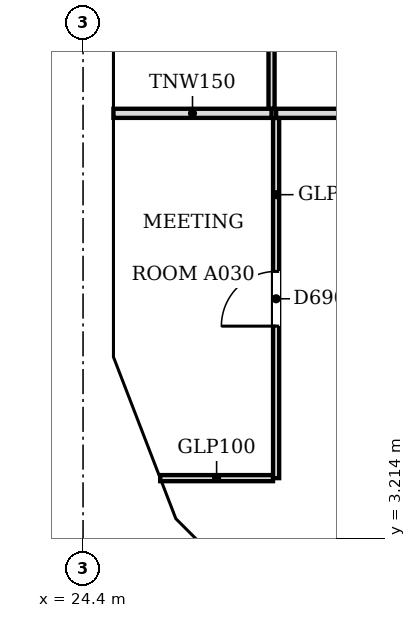
"""IFC4 building model, lengths in metres.
Left out: names, types, materials, properties, quantities, classifications, styles, units other than length and angle.
Written with IfcOpenShell. Run it as: python <this file> out.ifc"""

import sys

from ifc_helpers import new_model, si_unit, direction, frame, frame_2d, origin, place, context, subcontext, project, spatial, polyline, rectangle, outline, extrude, faceted_brep, source, transform, mapped, element, fill, save


model = new_model("IFC4")
c1 = context("Model", 3, precision=1e-05, world=origin(), true_north=direction((0.0, 1.0)))
c2 = subcontext(c1, "Body", "Model", "MODEL_VIEW")
j1 = project(units=[si_unit("LENGTHUNIT", "METRE"), si_unit("PLANEANGLEUNIT", "RADIAN")], contexts=[c1])
p1 = place(None, origin())
s1 = spatial("IfcSite", under=j1, at=p1, CompositionType="ELEMENT")
p2 = place(p1, origin())
s2 = spatial("IfcBuilding", under=s1, at=p2, CompositionType="ELEMENT")
p3 = place(p2, frame((0.0, 0.0, 99.0)))
s3 = spatial("IfcBuildingStorey", under=s2, at=p3, CompositionType="ELEMENT", Elevation=99.0)
m1 = source(origin(), c2, "Body", "Brep", [
    faceted_brep([(3.096, -0.25, 0.0), (6.1, -0.25, 3.8), (3.096, -0.25, 7.6), (0.047, -0.25, 3.857), (0.047, -0.25, 3.743), (0.0, 0.25, 3.8), (3.096, 0.25, 7.6), (6.053, 0.25, 3.859), (6.053, 0.25, 3.741), (3.096, 0.25, 0.0), (6.1, -0.0, 3.8), (0.0, 0.0, 3.8)], [[[0, 1, 2, 3, 4]], [[5, 6, 7, 8, 9]], [[9, 8, 10, 1, 0]], [[7, 6, 2, 1, 10]], [[6, 5, 11, 3, 2]], [[5, 9, 0, 4, 11]], [[11, 4, 3]], [[10, 8, 7]]]),
])
p4 = place(p3, frame((24.65, 12.247, -3.8), z_axis=(0.0, 0.0, 1.0), x_axis=(0.0, -1.0, 0.0)))
e1 = element("IfcWall", 1, at=p4, inside=s3, PredefinedType="SOLIDWALL", context=c2, shape_type="MappedRepresentation", body=[
    mapped(m1, transform((0.0, 0.0, 0.0), scale=1.0)),
])
m2 = source(origin(), c2, "Body", "SweptSolid", [
    extrude(outline(polyline([(3.094, 0.399), (5.781, 3.8), (3.094, 7.201), (0.323, 3.8), (3.094, 0.399)])), frame((0.0, 0.26, 0.0), z_axis=(0.0, -1.0, 0.0), x_axis=(1.0, 0.0, 0.0)), (0.0, 0.0, 1.0), 0.52),
])
p5 = place(p4, origin())
e2 = element("IfcOpeningElement", 2, at=p5, cuts=e1, PredefinedType="OPENING", context=c2, shape_type="MappedRepresentation", body=[
    mapped(m2, transform((0.0, 0.0, 0.0), scale=1.0)),
])
m3 = source(origin(), c2, "Body", "Brep", [
    faceted_brep([(2.95, -0.25, 0.0), (3.003, -0.25, 0.068), (3.003, -0.25, 7.532), (2.95, -0.25, 7.6), (0.0, -0.25, 3.8), (0.047, 0.25, 3.86), (2.898, 0.25, 7.532), (2.898, 0.25, 0.068), (0.047, 0.25, 3.74), (2.95, 0.0, 0.0), (2.95, 0.0, 7.6), (0.0, 0.0, 3.8)], [[[0, 1, 2, 3, 4]], [[5, 6, 7, 8]], [[1, 0, 9]], [[10, 3, 2]], [[6, 5, 11, 4, 3, 10]], [[8, 7, 9, 0, 4, 11]], [[8, 11, 5]], [[1, 9, 7, 6, 10, 2]]]),
])
p6 = place(p3, frame((24.65, 6.146, -3.8), z_axis=(0.0, 0.0, 1.0), x_axis=(0.359953949349, -0.932970071518, 0.0)))
e3 = element("IfcWall", 3, at=p6, inside=s3, PredefinedType="SOLIDWALL", context=c2, shape_type="MappedRepresentation", body=[
    mapped(m3, transform((0.0, 0.0, 0.0), scale=1.0)),
])
m4 = source(origin(), c2, "Body", "SweptSolid", [
    extrude(outline(polyline([(2.75, 6.935), (0.316, 3.8), (2.75, 0.665), (2.75, 6.935)])), frame((0.0, 0.26, 0.0), z_axis=(0.0, -1.0, 0.0), x_axis=(1.0, 0.0, 0.0)), (0.0, 0.0, 1.0), 0.52),
])
p7 = place(p6, origin())
e4 = element("IfcOpeningElement", 4, at=p7, cuts=e3, PredefinedType="OPENING", context=c2, shape_type="MappedRepresentation", body=[
    mapped(m4, transform((0.0, 0.0, 0.0), scale=1.0)),
])
m5 = source(origin(), c2, "Body", "Brep", [
    faceted_brep([(0.053, -0.25, 0.0), (2.997, -0.25, 3.8), (0.053, -0.25, 7.6), (0.0, -0.25, 7.532), (0.0, -0.25, 0.068), (0.106, 0.25, 7.532), (2.944, 0.25, 3.868), (2.944, 0.25, 3.732), (0.106, 0.25, 0.068), (2.997, 0.0, 3.8), (0.053, 0.0, 0.0), (0.053, 0.0, 7.6)], [[[0, 1, 2, 3, 4]], [[5, 6, 7, 8]], [[8, 7, 9, 1, 0, 10]], [[6, 5, 11, 2, 1, 9]], [[3, 2, 11]], [[10, 0, 4]], [[8, 10, 4, 3, 11, 5]], [[9, 7, 6]]]),
])
p8 = place(p3, frame((25.675, 3.431, -3.8), z_axis=(0.0, 0.0, 1.0), x_axis=(0.707106781187, -0.707106781187, 0.0)))
e5 = element("IfcWall", 5, at=p8, inside=s3, PredefinedType="SOLIDWALL", context=c2, shape_type="MappedRepresentation", body=[
    mapped(m5, transform((0.0, 0.0, 0.0), scale=1.0)),
])
m6 = source(origin(), c2, "Body", "SweptSolid", [
    extrude(outline(polyline([(0.253, 0.666), (2.681, 3.8), (0.253, 6.934), (0.253, 0.666)])), frame((0.0, 0.26, 0.0), z_axis=(0.0, -1.0, 0.0), x_axis=(1.0, 0.0, 0.0)), (0.0, 0.0, 1.0), 0.52),
])
p9 = place(p8, origin())
e6 = element("IfcOpeningElement", 6, at=p9, cuts=e5, PredefinedType="OPENING", context=c2, shape_type="MappedRepresentation", body=[
    mapped(m6, transform((0.0, 0.0, 0.0), scale=1.0)),
])
p10 = place(p2, frame((0.0, 0.0, 102.8)))
s4 = spatial("IfcBuildingStorey", under=s2, at=p10, CompositionType="ELEMENT", Elevation=102.8)
m7 = source(origin(), c2, "Body", "Brep", [
    faceted_brep([(0.093, -0.25, 0.057), (3.143, -0.25, 3.8), (0.093, -0.25, 7.543), (0.0, 0.25, 7.544), (0.047, 0.25, 7.6), (3.143, 0.25, 3.8), (0.047, 0.25, 0.0), (0.0, 0.25, 0.056), (0.047, 0.0, 0.0), (0.047, 0.0, 7.6)], [[[0, 1, 2]], [[3, 4, 5, 6, 7]], [[6, 5, 1, 0, 8]], [[5, 4, 9, 2, 1]], [[4, 3, 9]], [[7, 6, 8]], [[7, 8, 0, 2, 9, 3]]]),
])
p11 = place(p10, frame((24.65, 12.293, -3.8), z_axis=(0.0, 0.0, 1.0), x_axis=(0.0, -1.0, 0.0)))
e7 = element("IfcWall", 7, at=p11, inside=s4, PredefinedType="SOLIDWALL", context=c2, shape_type="MappedRepresentation", body=[
    mapped(m7, transform((0.0, 0.0, 0.0), scale=1.0)),
])
m8 = source(origin(), c2, "Body", "SweptSolid", [
    extrude(outline(polyline([(0.247, 0.641), (2.821, 3.8), (0.247, 6.959), (0.247, 0.641)])), frame((0.0, 0.26, 0.0), z_axis=(0.0, -1.0, 0.0), x_axis=(1.0, 0.0, 0.0)), (0.0, 0.0, 1.0), 0.52),
])
p12 = place(p11, origin())
e8 = element("IfcOpeningElement", 8, at=p12, cuts=e7, PredefinedType="OPENING", context=c2, shape_type="MappedRepresentation", body=[
    mapped(m8, transform((0.0, 0.0, 0.0), scale=1.0)),
])
m9 = source(origin(), c2, "Body", "Brep", [
    faceted_brep([(3.003, -0.25, 0.0), (3.05, -0.25, 0.06), (3.05, -0.25, 7.54), (3.003, -0.25, 7.6), (0.0, -0.25, 3.8), (0.0, 0.25, 3.8), (2.957, 0.25, 7.541), (2.957, 0.25, 0.059), (3.003, 0.0, 0.0), (3.003, 0.0, 7.6)], [[[0, 1, 2, 3, 4]], [[5, 6, 7]], [[1, 0, 8]], [[9, 3, 2]], [[6, 5, 4, 3, 9]], [[5, 7, 8, 0, 4]], [[1, 8, 7, 6, 9, 2]]]),
])
p13 = place(p10, frame((24.65, 9.15, -3.8), z_axis=(0.0, 0.0, 1.0), x_axis=(0.0, -1.0, 0.0)))
e9 = element("IfcWall", 9, at=p13, inside=s4, PredefinedType="SOLIDWALL", context=c2, shape_type="MappedRepresentation", body=[
    mapped(m9, transform((0.0, 0.0, 0.0), scale=1.0)),
])
m10 = source(origin(), c2, "Body", "SweptSolid", [
    extrude(outline(polyline([(2.803, 6.944), (0.319, 3.8), (2.803, 0.656), (2.803, 6.944)])), frame((0.0, 0.26, 0.0), z_axis=(0.0, -1.0, 0.0), x_axis=(1.0, 0.0, 0.0)), (0.0, 0.0, 1.0), 0.52),
])
p14 = place(p13, origin())
e10 = element("IfcOpeningElement", 10, at=p14, cuts=e9, PredefinedType="OPENING", context=c2, shape_type="MappedRepresentation", body=[
    mapped(m10, transform((0.0, 0.0, 0.0), scale=1.0)),
])
m11 = source(origin(), c2, "Body", "Brep", [
    faceted_brep([(0.047, -0.25, 0.0), (2.997, -0.25, 3.8), (0.047, -0.25, 7.6), (0.0, -0.25, 7.541), (0.0, -0.25, 0.059), (0.093, 0.25, 7.54), (2.944, 0.25, 3.868), (2.944, 0.25, 3.732), (0.093, 0.25, 0.06), (2.997, 0.0, 3.8), (0.047, 0.0, 0.0), (0.047, 0.0, 7.6)], [[[0, 1, 2, 3, 4]], [[5, 6, 7, 8]], [[8, 7, 9, 1, 0, 10]], [[6, 5, 11, 2, 1, 9]], [[3, 2, 11]], [[10, 0, 4]], [[8, 10, 4, 3, 11, 5]], [[9, 7, 6]]]),
])
p15 = place(p10, frame((24.633, 6.19, -3.8), z_axis=(0.0, 0.0, 1.0), x_axis=(0.359901446078, -0.932990326376, 0.0)))
e11 = element("IfcWall", 11, at=p15, inside=s4, PredefinedType="SOLIDWALL", context=c2, shape_type="MappedRepresentation", body=[
    mapped(m11, transform((0.0, 0.0, 0.0), scale=1.0)),
])
m12 = source(origin(), c2, "Body", "SweptSolid", [
    extrude(outline(polyline([(0.247, 0.665), (2.681, 3.8), (0.247, 6.935), (0.247, 0.665)])), frame((0.0, 0.26, 0.0), z_axis=(0.0, -1.0, 0.0), x_axis=(1.0, 0.0, 0.0)), (0.0, 0.0, 1.0), 0.52),
])
p16 = place(p15, origin())
e12 = element("IfcOpeningElement", 12, at=p16, cuts=e11, PredefinedType="OPENING", context=c2, shape_type="MappedRepresentation", body=[
    mapped(m12, transform((0.0, 0.0, 0.0), scale=1.0)),
])
m13 = source(origin(), c2, "Body", "Brep", [
    faceted_brep([(2.944, -0.25, 0.0), (2.997, -0.25, 0.068), (2.997, -0.25, 7.532), (2.944, -0.25, 7.6), (0.0, -0.25, 3.8), (0.053, 0.25, 3.868), (2.891, 0.25, 7.532), (2.891, 0.25, 0.068), (0.053, 0.25, 3.732), (2.944, 0.0, 0.0), (2.944, 0.0, 7.6), (0.0, 0.0, 3.8)], [[[0, 1, 2, 3, 4]], [[5, 6, 7, 8]], [[1, 0, 9]], [[10, 3, 2]], [[6, 5, 11, 4, 3, 10]], [[8, 7, 9, 0, 4, 11]], [[8, 11, 5]], [[1, 9, 7, 6, 10, 2]]]),
])
p17 = place(p10, frame((25.712, 3.394, -3.8), z_axis=(0.0, 0.0, 1.0), x_axis=(0.707066050402, -0.707147509625, 0.0)))
e13 = element("IfcWall", 13, at=p17, inside=s4, PredefinedType="SOLIDWALL", context=c2, shape_type="MappedRepresentation", body=[
    mapped(m13, transform((0.0, 0.0, 0.0), scale=1.0)),
])
m14 = source(origin(), c2, "Body", "SweptSolid", [
    extrude(outline(polyline([(2.744, 6.934), (0.316, 3.8), (2.744, 0.666), (2.744, 6.934)])), frame((0.0, 0.26, 0.0), z_axis=(0.0, -1.0, 0.0), x_axis=(1.0, 0.0, 0.0)), (0.0, 0.0, 1.0), 0.52),
])
p18 = place(p17, origin())
e14 = element("IfcOpeningElement", 14, at=p18, cuts=e13, PredefinedType="OPENING", context=c2, shape_type="MappedRepresentation", body=[
    mapped(m14, transform((0.0, 0.0, 0.0), scale=1.0)),
])
p19 = place(p3, frame((25.669, 4.2, 0.0), z_axis=(0.0, 0.0, 1.0), x_axis=(1.0, 0.0, 0.0)))
e15 = element("IfcWall", 15, at=p19, inside=s3, PredefinedType="PARTITIONING", context=c2, shape_type="SweptSolid", body=[
    extrude(rectangle(XDim=1.855, YDim=0.1, at=frame_2d((0.928, 0.0))), origin(), (0.0, 0.0, 1.0), 3.067),
])
p20 = place(p3, frame((27.575, 4.2, 0.0), z_axis=(0.0, 0.0, 1.0), x_axis=(0.0, 1.0, 0.0)))
e16 = element("IfcWall", 16, at=p20, inside=s3, PredefinedType="PARTITIONING", context=c2, shape_type="SweptSolid", body=[
    extrude(rectangle(XDim=5.924, YDim=0.1, at=frame_2d((2.962, 0.0))), origin(), (0.0, 0.0, 1.0), 3.067),
])
m15 = source(origin(), c2, "Body", "SweptSolid", [
    extrude(rectangle(XDim=0.9, YDim=2.1, at=frame_2d((0.45, 1.05))), frame((0.0, 0.06, 0.0), z_axis=(0.0, -1.0, 0.0), x_axis=(1.0, 0.0, 0.0)), (0.0, 0.0, 1.0), 0.12),
])
p21 = place(p20, frame((2.5, 0.0, 0.0)))
e17 = element("IfcOpeningElement", 17, at=p21, cuts=e16, PredefinedType="OPENING", context=c2, shape_type="MappedRepresentation", body=[
    mapped(m15, transform((0.0, 0.0, 0.0), scale=1.0)),
])
p22 = place(p3, frame((24.9, 10.2, 0.0), z_axis=(0.0, 0.0, 1.0), x_axis=(1.0, 0.0, 0.0)))
e18 = element("IfcWall", 18, at=p22, inside=s3, PredefinedType="PARTITIONING", context=c2, shape_type="SweptSolid", body=[
    extrude(rectangle(XDim=2.6, YDim=0.15, at=frame_2d((1.3, 0.0))), origin(), (0.0, 0.0, 1.0), 3.067),
])
p23 = place(p3, frame((27.575, 10.2, 0.0), z_axis=(0.0, 0.0, 1.0), x_axis=(1.0, 0.0, 0.0)))
e19 = element("IfcWall", 19, at=p23, inside=s3, PredefinedType="PARTITIONING", context=c2, shape_type="SweptSolid", body=[
    extrude(rectangle(XDim=17.349, YDim=0.15, at=frame_2d((8.675, 0.0))), origin(), (0.0, 0.0, 1.0), 3.067),
])
p24 = place(p3, frame((27.5, 10.276, 0.0), z_axis=(0.0, 0.0, 1.0), x_axis=(0.0, 1.0, 0.0)))
e20 = element("IfcWall", 20, at=p24, inside=s3, PredefinedType="PARTITIONING", context=c2, shape_type="SweptSolid", body=[
    extrude(rectangle(XDim=8.448, YDim=0.1, at=frame_2d((4.224, 0.0))), origin(), (0.0, 0.0, 1.0), 3.067),
])
p25 = place(p24, frame((3.8, 0.0, 0.0)))
e21 = element("IfcOpeningElement", 21, at=p25, cuts=e20, PredefinedType="OPENING", context=c2, shape_type="MappedRepresentation", body=[
    mapped(m15, transform((0.0, 0.0, 0.0), scale=1.0)),
])
m16 = source(origin(), c2, "Body", "SweptSolid", [
    extrude(rectangle(XDim=0.9, YDim=2.1, at=frame_2d((0.45, 1.05))), frame((0.0, 0.025, 0.0), z_axis=(0.0, -1.0, 0.0), x_axis=(1.0, 0.0, 0.0)), (0.0, 0.0, 1.0), 0.05),
])
p26 = place(p21, origin())
e22 = element("IfcDoor", 22, at=p26, inside=s3, OperationType="SINGLE_SWING_LEFT", PredefinedType="DOOR", context=c2, shape_type="MappedRepresentation", body=[
    mapped(m16, transform((0.0, 0.0, 0.0), scale=1.0)),
])
fill(e17, e22)
save(model, sys.argv[1])
